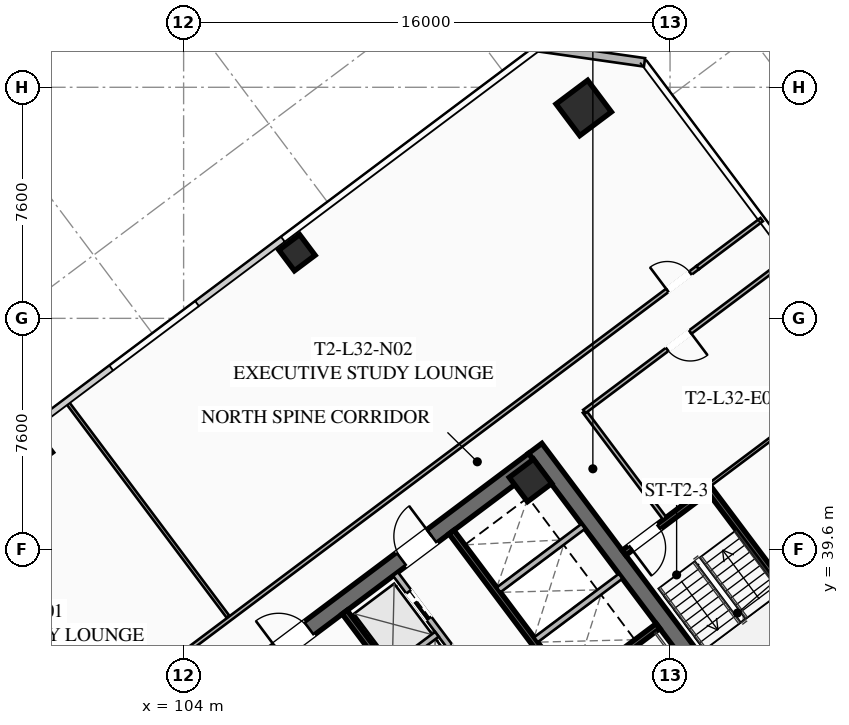
"""IFC4 building model, lengths in metres.
Left out: names, types, materials, properties, quantities, classifications, styles, units other than length and angle.
Written with IfcOpenShell. Run it as: python <this file> out.ifc"""

import sys

from ifc_helpers import new_model, si_unit, direction, frame, frame_2d, origin, origin_2d, place, context, subcontext, project, spatial, rectangle, hollow_rectangle, extrude, element, fill, save


model = new_model("IFC4")
c1 = context("Model", 3, precision=1e-05, world=origin(), true_north=direction((0.0, 1.0)))
c2 = subcontext(c1, "Body", "Model", "MODEL_VIEW")
j1 = project(units=[si_unit("LENGTHUNIT", "METRE"), si_unit("PLANEANGLEUNIT", "RADIAN")], contexts=[c1])
p1 = place(None, origin())
s1 = spatial("IfcSite", under=j1, at=p1, CompositionType="ELEMENT")
p2 = place(p1, origin())
s2 = spatial("IfcBuilding", under=s1, at=p2, CompositionType="ELEMENT")
p3 = place(p2, frame((0.0, 0.0, 121.5)))
s3 = spatial("IfcBuildingStorey", under=s2, at=p3, CompositionType="ELEMENT", Elevation=121.5)
p4 = place(p3, frame((115.564, 42.923, 0.0), z_axis=(0.0, 0.0, 1.0), x_axis=(0.600005007985, -0.799996243986, 0.0)))
e1 = element("IfcWall", 1, at=p4, inside=s3, PredefinedType="SHEAR", context=c2, shape_type="SweptSolid", body=[
    extrude(rectangle(XDim=15.6, YDim=0.55, at=frame_2d((7.8, 0.0))), origin(), (0.0, 0.0, 1.0), 3.55),
])
p5 = place(p3, frame((103.461, 33.502, 0.0), z_axis=(0.0, 0.0, 1.0), x_axis=(0.799998054672, 0.600002593761, 0.0)))
e2 = element("IfcWall", 2, at=p5, inside=s3, PredefinedType="SHEAR", context=c2, shape_type="SweptSolid", body=[
    extrude(rectangle(XDim=15.06, YDim=0.55, at=frame_2d((7.53, 0.0))), origin(), (0.0, 0.0, 1.0), 3.55),
])
p6 = place(p5, frame((4.58, 0.0, 0.0)))
e3 = element("IfcOpeningElement", 3, at=p6, cuts=e2, PredefinedType="OPENING", context=c2, shape_type="SweptSolid", body=[
    extrude(rectangle(XDim=1.25, YDim=2.25, at=frame_2d((0.625, 1.125))), frame((0.0, 0.285, 0.0), z_axis=(0.0, -1.0, 0.0), x_axis=(1.0, 0.0, 0.0)), (0.0, 0.0, 1.0), 0.57),
])
p7 = place(p5, frame((9.63, 0.0, 0.0)))
e4 = element("IfcOpeningElement", 4, at=p7, cuts=e2, PredefinedType="OPENING", context=c2, shape_type="SweptSolid", body=[
    extrude(rectangle(XDim=1.25, YDim=2.25, at=frame_2d((0.625, 1.125))), frame((0.0, 0.285, 0.0), z_axis=(0.0, -1.0, 0.0), x_axis=(1.0, 0.0, 0.0)), (0.0, 0.0, 1.0), 0.57),
])
p8 = place(p3, frame((115.41, 41.87, 0.0), z_axis=(0.0, 0.0, 1.0), x_axis=(0.799999996291, 0.600000004945, 0.0)))
e5 = element("IfcColumn", 5, at=p8, inside=s3, PredefinedType="COLUMN", context=c2, shape_type="SweptSolid", body=[
    extrude(hollow_rectangle(XDim=1.0, YDim=1.0, WallThickness=0.04, at=origin_2d()), origin(), (0.0, 0.0, 1.0), 3.37),
])
p9 = place(p3, frame((117.16, 54.12, 0.0), z_axis=(0.0, 0.0, 1.0), x_axis=(0.799999996291, 0.600000004945, 0.0)))
e6 = element("IfcColumn", 6, at=p9, inside=s3, PredefinedType="COLUMN", context=c2, shape_type="SweptSolid", body=[
    extrude(hollow_rectangle(XDim=1.3, YDim=1.3, WallThickness=0.05, at=origin_2d()), origin(), (0.0, 0.0, 1.0), 3.37),
])
for number, where, z_axis, x_axis in (
    (7, (107.73, 49.36, 0.0), (0.0, 0.0, 1.0), (0.8, 0.6, 0.0)),
    (8, (99.09, 42.88, 0.0), (0.0, 0.0, 1.0), (0.8, 0.6, 0.0)),
):
    element("IfcColumn", number, at=place(p3, frame(where, z_axis=z_axis, x_axis=x_axis)), inside=s3, PredefinedType="COLUMN", context=c2, shape_type="SweptSolid", body=[
        extrude(hollow_rectangle(XDim=0.85, YDim=0.85, WallThickness=0.035, at=origin_2d()), origin(), (0.0, 0.0, 1.0), 3.37),
    ])
p10 = place(p3, frame((115.66, 56.12, 0.0), z_axis=(0.0, 0.0, 1.0), x_axis=(0.989949493661, -0.141421356237, 0.0)))
e9 = element("IfcWall", 9, at=p10, inside=s3, PredefinedType="SOLIDWALL", context=c2, shape_type="SweptSolid", body=[
    extrude(rectangle(XDim=3.536, YDim=0.28, at=frame_2d((1.768, 0.0))), origin(), (0.0, 0.0, 1.0), 3.37),
])
p11 = place(p3, frame((116.54, 34.78, 0.0), z_axis=(0.0, 0.0, 1.0), x_axis=(0.800015298837, 0.599979601008, 0.0)))
e10 = element("IfcWall", 10, at=p11, inside=s3, PredefinedType="SHEAR", context=c2, shape_type="SweptSolid", body=[
    extrude(rectangle(XDim=3.83, YDim=0.2, at=frame_2d((1.915, 0.0))), origin(), (0.0, 0.0, 1.0), 3.37),
])
p12 = place(p3, frame((117.998, 25.936, 0.0), z_axis=(0.0, 0.0, 1.0), x_axis=(-0.600002693989, 0.799997979501, 0.0)))
e11 = element("IfcWall", 11, at=p12, inside=s3, PredefinedType="SHEAR", context=c2, shape_type="SweptSolid", body=[
    extrude(rectangle(XDim=14.5, YDim=0.2, at=frame_2d((7.25, 0.0))), origin(), (0.0, 0.0, 1.0), 3.37),
])
p13 = place(p3, frame((112.81, 40.17, 0.0), z_axis=(0.0, 0.0, 1.0), x_axis=(0.599993943644, -0.800004542231, 0.0)))
e12 = element("IfcWall", 12, at=p13, inside=s3, PredefinedType="SHEAR", context=c2, shape_type="SweptSolid", body=[
    extrude(rectangle(XDim=6.45, YDim=0.2, at=frame_2d((3.225, 0.0))), origin(), (0.0, 0.0, 1.0), 3.37),
])
for number, where, z_axis, x_axis in (
    (13, (115.59, 36.63, 0.0), (0.0, 0.0, 1.0), (0.8, 0.6, 0.0)),
    (14, (114.36, 38.27, 0.0), (0.0, 0.0, 1.0), (0.8, 0.6, 0.0)),
):
    element("IfcWall", number, at=place(p3, frame(where, z_axis=z_axis, x_axis=x_axis)), inside=s3, PredefinedType="SOLIDWALL", context=c2, shape_type="SweptSolid", body=[
        extrude(rectangle(XDim=3.48, YDim=0.2, at=frame_2d((1.74, 0.0))), origin(), (0.0, 0.0, 1.0), 3.37),
    ])
p14 = place(p3, frame((115.11, 33.27, 0.0), z_axis=(0.0, 0.0, 1.0), x_axis=(-0.600011322243, 0.799991508192, 0.0)))
e15 = element("IfcWall", 15, at=p14, inside=s3, PredefinedType="SOLIDWALL", context=c2, shape_type="SweptSolid", body=[
    extrude(rectangle(XDim=6.9, YDim=0.2, at=frame_2d((3.45, 0.0))), origin(), (0.0, 0.0, 1.0), 3.37),
])
p15 = place(p14, frame((0.575, 0.0, 0.0)))
e16 = element("IfcOpeningElement", 16, at=p15, cuts=e15, PredefinedType="OPENING", context=c2, shape_type="SweptSolid", body=[
    extrude(rectangle(XDim=1.1, YDim=2.2, at=frame_2d((0.55, 1.1))), frame((0.0, 0.11, 0.0), z_axis=(0.0, -1.0, 0.0), x_axis=(1.0, 0.0, 0.0)), (0.0, 0.0, 1.0), 0.22),
])
p16 = place(p14, frame((2.825, 0.0, 0.0)))
e17 = element("IfcOpeningElement", 17, at=p16, cuts=e15, PredefinedType="OPENING", context=c2, shape_type="SweptSolid", body=[
    extrude(rectangle(XDim=1.1, YDim=2.2, at=frame_2d((0.55, 1.1))), frame((0.0, 0.11, 0.0), z_axis=(0.0, -1.0, 0.0), x_axis=(1.0, 0.0, 0.0)), (0.0, 0.0, 1.0), 0.22),
])
p17 = place(p14, frame((5.075, 0.0, 0.0)))
e18 = element("IfcOpeningElement", 18, at=p17, cuts=e15, PredefinedType="OPENING", context=c2, shape_type="SweptSolid", body=[
    extrude(rectangle(XDim=1.1, YDim=2.2, at=frame_2d((0.55, 1.1))), frame((0.0, 0.11, 0.0), z_axis=(0.0, -1.0, 0.0), x_axis=(1.0, 0.0, 0.0)), (0.0, 0.0, 1.0), 0.22),
])
p18 = place(p3, frame((110.826, 35.682, 0.0), z_axis=(0.0, 0.0, 1.0), x_axis=(0.799984418148, 0.600020775241, 0.0)))
e19 = element("IfcWall", 19, at=p18, inside=s3, PredefinedType="SOLIDWALL", context=c2, shape_type="SweptSolid", body=[
    extrude(rectangle(XDim=1.88, YDim=0.2, at=frame_2d((0.94, 0.0))), origin(), (0.0, 0.0, 1.0), 3.37),
])
p19 = place(p3, frame((125.304, 36.228, 0.0), z_axis=(0.0, 0.0, 1.0), x_axis=(-0.59998851072, 0.800008616831, 0.0)))
e20 = element("IfcWall", 20, at=p19, inside=s3, PredefinedType="SHEAR", context=c2, shape_type="SweptSolid", body=[
    extrude(rectangle(XDim=6.8, YDim=0.2, at=frame_2d((3.4, 0.0))), origin(), (0.0, 0.0, 1.0), 3.37),
])
p20 = place(p3, frame((121.204, 41.528, 0.0), z_axis=(0.0, 0.0, 1.0), x_axis=(-0.800017232136, -0.599977023131, 0.0)))
e21 = element("IfcWall", 21, at=p20, inside=s3, PredefinedType="SHEAR", context=c2, shape_type="SweptSolid", body=[
    extrude(rectangle(XDim=3.4, YDim=0.2, at=frame_2d((1.7, 0.0))), origin(), (0.0, 0.0, 1.0), 3.37),
])
p21 = place(p20, frame((1.975, 0.0, 0.0)))
e22 = element("IfcOpeningElement", 22, at=p21, cuts=e21, PredefinedType="OPENING", context=c2, shape_type="SweptSolid", body=[
    extrude(rectangle(XDim=1.15, YDim=2.2, at=frame_2d((0.575, 1.1))), frame((0.0, 0.11, 0.0), z_axis=(0.0, -1.0, 0.0), x_axis=(1.0, 0.0, 0.0)), (0.0, 0.0, 1.0), 0.22),
])
p22 = place(p3, frame((119.824, 40.618, 0.0), z_axis=(0.0, 0.0, 1.0), x_axis=(-0.599982243973, 0.800013316712, 0.0)))
e23 = element("IfcWall", 23, at=p22, inside=s3, PredefinedType="PARTITIONING", context=c2, shape_type="SweptSolid", body=[
    extrude(rectangle(XDim=4.4, YDim=0.135, at=frame_2d((2.2, 0.0))), origin(), (0.0, 0.0, 1.0), 2.723),
])
p23 = place(p3, frame((95.87, 30.09, 0.0), z_axis=(0.0, 0.0, 1.0), x_axis=(0.799997191971, 0.600003744021, 0.0)))
e24 = element("IfcWall", 24, at=p23, inside=s3, PredefinedType="PARTITIONING", context=c2, shape_type="SweptSolid", body=[
    extrude(rectangle(XDim=31.3, YDim=0.135, at=frame_2d((15.65, 0.0))), origin(), (0.0, 0.0, 1.0), 2.723),
])
p24 = place(p23, frame((0.3, 0.0, 0.0)))
e25 = element("IfcOpeningElement", 25, at=p24, cuts=e24, PredefinedType="OPENING", context=c2, shape_type="SweptSolid", body=[
    extrude(rectangle(XDim=0.95, YDim=2.05, at=frame_2d((0.475, 1.025))), frame((0.0, 0.077, 0.0), z_axis=(0.0, -1.0, 0.0), x_axis=(1.0, 0.0, 0.0)), (0.0, 0.0, 1.0), 0.155),
])
p25 = place(p23, frame((30.05, 0.0, 0.0)))
e26 = element("IfcOpeningElement", 26, at=p25, cuts=e24, PredefinedType="OPENING", context=c2, shape_type="SweptSolid", body=[
    extrude(rectangle(XDim=0.95, YDim=2.05, at=frame_2d((0.475, 1.025))), frame((0.0, 0.077, 0.0), z_axis=(0.0, -1.0, 0.0), x_axis=(1.0, 0.0, 0.0)), (0.0, 0.0, 1.0), 0.155),
])
p26 = place(p3, frame((120.91, 48.87, 0.0), z_axis=(0.0, 0.0, 1.0), x_axis=(0.80002227902, 0.599970293491, 0.0)))
e27 = element("IfcWall", 27, at=p26, inside=s3, PredefinedType="PARTITIONING", context=c2, shape_type="SweptSolid", body=[
    extrude(rectangle(XDim=2.63, YDim=0.135, at=frame_2d((1.315, 0.0))), origin(), (0.0, 0.0, 1.0), 2.723),
])
p27 = place(p3, frame((105.462, 37.384, 0.0), z_axis=(0.0, 0.0, 1.0), x_axis=(-0.599982344389, 0.800013241404, 0.0)))
e28 = element("IfcWall", 28, at=p27, inside=s3, PredefinedType="PARTITIONING", context=c2, shape_type="SweptSolid", body=[
    extrude(rectangle(XDim=8.85, YDim=0.11, at=frame_2d((4.425, 0.0))), origin(), (0.0, 0.0, 1.0), 2.723),
])
p28 = place(p3, frame((123.944, 49.208, 0.0), z_axis=(0.0, 0.0, 1.0), x_axis=(-0.799996532921, -0.600004622744, 0.0)))
e29 = element("IfcWall", 29, at=p28, inside=s3, PredefinedType="PARTITIONING", context=c2, shape_type="SweptSolid", body=[
    extrude(rectangle(XDim=8.45, YDim=0.135, at=frame_2d((4.225, 0.0))), origin(), (0.0, 0.0, 1.0), 2.723),
])
p29 = place(p28, frame((4.1, 0.0, 0.0)))
e30 = element("IfcOpeningElement", 30, at=p29, cuts=e29, PredefinedType="OPENING", context=c2, shape_type="SweptSolid", body=[
    extrude(rectangle(XDim=0.95, YDim=2.05, at=frame_2d((0.475, 1.025))), frame((0.0, 0.077, 0.0), z_axis=(0.0, -1.0, 0.0), x_axis=(1.0, 0.0, 0.0)), (0.0, 0.0, 1.0), 0.155),
])
p30 = place(p3, frame((126.584, 45.688, 0.0), z_axis=(0.0, 0.0, 1.0), x_axis=(-0.800004438899, -0.599994081423, 0.0)))
e31 = element("IfcWall", 31, at=p30, inside=s3, PredefinedType="PARTITIONING", context=c2, shape_type="SweptSolid", body=[
    extrude(rectangle(XDim=6.6, YDim=0.11, at=frame_2d((3.3, 0.0))), origin(), (0.0, 0.0, 1.0), 2.723),
])
p31 = place(p6, origin())
e32 = element("IfcDoor", 32, at=p31, inside=s3, OperationType="SINGLE_SWING_LEFT", PredefinedType="DOOR", context=c2, shape_type="SweptSolid", body=[
    extrude(rectangle(XDim=1.25, YDim=2.25, at=frame_2d((0.625, 1.125))), frame((0.0, 0.025, 0.0), z_axis=(0.0, -1.0, 0.0), x_axis=(1.0, 0.0, 0.0)), (0.0, 0.0, 1.0), 0.05),
])
fill(e3, e32)
p32 = place(p7, origin())
e33 = element("IfcDoor", 33, at=p32, inside=s3, OperationType="SINGLE_SWING_RIGHT", PredefinedType="DOOR", context=c2, shape_type="SweptSolid", body=[
    extrude(rectangle(XDim=1.25, YDim=2.25, at=frame_2d((0.625, 1.125))), frame((0.0, 0.025, 0.0), z_axis=(0.0, -1.0, 0.0), x_axis=(1.0, 0.0, 0.0)), (0.0, 0.0, 1.0), 0.05),
])
fill(e4, e33)
p33 = place(p21, origin())
e34 = element("IfcDoor", 34, at=p33, inside=s3, OperationType="SINGLE_SWING_RIGHT", PredefinedType="DOOR", context=c2, shape_type="SweptSolid", body=[
    extrude(rectangle(XDim=1.15, YDim=2.2, at=frame_2d((0.575, 1.1))), frame((0.0, 0.025, 0.0), z_axis=(0.0, -1.0, 0.0), x_axis=(1.0, 0.0, 0.0)), (0.0, 0.0, 1.0), 0.05),
])
fill(e22, e34)
p34 = place(p25, origin())
e35 = element("IfcDoor", 35, at=p34, inside=s3, OperationType="SINGLE_SWING_LEFT", PredefinedType="DOOR", context=c2, shape_type="SweptSolid", body=[
    extrude(rectangle(XDim=0.95, YDim=2.05, at=frame_2d((0.475, 1.025))), frame((0.0, 0.025, 0.0), z_axis=(0.0, -1.0, 0.0), x_axis=(1.0, 0.0, 0.0)), (0.0, 0.0, 1.0), 0.05),
])
fill(e26, e35)
p35 = place(p29, origin())
e36 = element("IfcDoor", 36, at=p35, inside=s3, OperationType="SINGLE_SWING_LEFT", PredefinedType="DOOR", context=c2, shape_type="SweptSolid", body=[
    extrude(rectangle(XDim=0.95, YDim=2.05, at=frame_2d((0.475, 1.025))), frame((0.0, 0.025, 0.0), z_axis=(0.0, -1.0, 0.0), x_axis=(1.0, 0.0, 0.0)), (0.0, 0.0, 1.0), 0.05),
])
fill(e30, e36)
p36 = place(p17, origin())
e37 = element("IfcDoor", 37, at=p36, inside=s3, OperationType="SLIDING_TO_LEFT", PredefinedType="DOOR", context=c2, shape_type="SweptSolid", body=[
    extrude(rectangle(XDim=1.1, YDim=2.2, at=frame_2d((0.55, 1.1))), frame((0.0, 0.025, 0.0), z_axis=(0.0, -1.0, 0.0), x_axis=(1.0, 0.0, 0.0)), (0.0, 0.0, 1.0), 0.05),
])
fill(e18, e37)
save(model, sys.argv[1])
